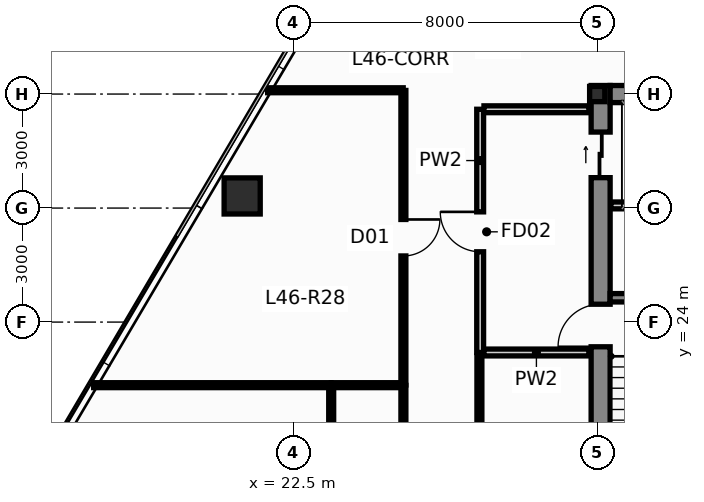
"""IFC4 building model, lengths in metres.
Left out: names, types, materials, properties, quantities, classifications, styles, units other than length and angle.
Written with IfcOpenShell. Run it as: python <this file> out.ifc"""

import sys

from ifc_helpers import new_model, si_unit, direction, frame, frame_2d, origin, origin_2d, place, context, subcontext, project, spatial, rectangle, hollow_rectangle, i_section, extrude, source, transform, mapped, element, fill, save


model = new_model("IFC4")
c1 = context("Model", 3, precision=1e-05, world=origin(), true_north=direction((0.0, 1.0)))
c2 = subcontext(c1, "Body", "Model", "MODEL_VIEW")
j1 = project(units=[si_unit("LENGTHUNIT", "METRE"), si_unit("PLANEANGLEUNIT", "RADIAN")], contexts=[c1])
p1 = place(None, origin())
s1 = spatial("IfcSite", under=j1, at=p1, CompositionType="ELEMENT")
p2 = place(p1, origin())
s2 = spatial("IfcBuilding", under=s1, at=p2, CompositionType="ELEMENT")
p3 = place(p2, frame((0.0, 0.0, 176.75)))
s3 = spatial("IfcBuildingStorey", under=s2, at=p3, CompositionType="ELEMENT", Elevation=176.75)
m1 = source(origin(), c2, "Body", "SweptSolid", [
    extrude(i_section(OverallWidth=0.4, OverallDepth=0.4, WebThickness=0.02, FlangeThickness=0.032, at=origin_2d()), origin(), (0.0, 0.0, 1.0), 3.65),
])
p4 = place(p3, frame((30.5, 30.0, 0.0), z_axis=(0.0, 0.0, 1.0), x_axis=(1.0, 0.0, 0.0)))
e1 = element("IfcColumn", 1, at=p4, inside=s3, PredefinedType="COLUMN", context=c2, shape_type="MappedRepresentation", body=[
    mapped(m1, transform((0.0, 0.0, 0.0), scale=1.0)),
])
p5 = place(p3, frame((30.59, 16.95, 0.0), z_axis=(0.0, 0.0, 1.0), x_axis=(0.0, 1.0, 0.0)))
e2 = element("IfcWall", 2, at=p5, inside=s3, PredefinedType="SHEAR", context=c2, shape_type="SweptSolid", body=[
    extrude(rectangle(XDim=13.275, YDim=0.5, at=frame_2d((6.638, 0.0))), origin(), (0.0, 0.0, 1.0), 3.65),
])
p6 = place(p5, frame((6.4, 0.0, 0.0)))
e3 = element("IfcOpeningElement", 3, at=p6, cuts=e2, PredefinedType="OPENING", context=c2, shape_type="SweptSolid", body=[
    extrude(rectangle(XDim=1.12, YDim=2.15, at=frame_2d((0.56, 1.075))), frame((0.0, 0.262, 0.0), z_axis=(0.0, -1.0, 0.0), x_axis=(1.0, 0.0, 0.0)), (0.0, 0.0, 1.0), 0.524),
])
p7 = place(p5, frame((10.85, 0.0, 0.0)))
e4 = element("IfcOpeningElement", 4, at=p7, cuts=e2, PredefinedType="OPENING", context=c2, shape_type="SweptSolid", body=[
    extrude(rectangle(XDim=1.2, YDim=2.2, at=frame_2d((0.6, 1.1))), frame((0.0, 0.262, 0.0), z_axis=(0.0, -1.0, 0.0), x_axis=(1.0, 0.0, 0.0)), (0.0, 0.0, 1.0), 0.524),
])
p8 = place(p3, frame((30.84, 30.0, 0.0), z_axis=(0.0, 0.0, 1.0), x_axis=(1.0, 0.0, 0.0)))
e5 = element("IfcWall", 5, at=p8, inside=s3, PredefinedType="SHEAR", context=c2, shape_type="SweptSolid", body=[
    extrude(rectangle(XDim=2.9, YDim=0.45, at=frame_2d((1.45, 0.0))), origin(), (0.0, 0.0, 1.0), 3.65),
])
p9 = place(p3, frame((30.84, 24.64, 0.0), z_axis=(0.0, 0.0, 1.0), x_axis=(1.0, 0.0, 0.0)))
e6 = element("IfcWall", 6, at=p9, inside=s3, PredefinedType="SHEAR", context=c2, shape_type="SweptSolid", body=[
    extrude(rectangle(XDim=2.9, YDim=0.22, at=frame_2d((1.45, 0.0))), origin(), (0.0, 0.0, 1.0), 3.65),
])
m2 = source(origin(), c2, "Body", "SweptSolid", [
    extrude(hollow_rectangle(XDim=0.95, YDim=0.95, WallThickness=0.05, at=origin_2d()), origin(), (0.0, 0.0, 1.0), 3.651),
])
p10 = place(p3, frame((21.157, 27.319, 0.0), z_axis=(0.014913299626, -0.013843287097, 0.999792957015), x_axis=(0.680325028146, 0.732910537568, 0.0)))
e7 = element("IfcColumn", 7, at=p10, inside=s3, PredefinedType="COLUMN", context=c2, shape_type="MappedRepresentation", body=[
    mapped(m2, transform((0.0, 0.0, 0.0), scale=1.0)),
])
p11 = place(p3, frame((27.42, 23.2, 0.0), z_axis=(0.0, 0.0, 1.0), x_axis=(0.0, 1.0, 0.0)))
e8 = element("IfcWall", 8, at=p11, inside=s3, PredefinedType="PARTITIONING", context=c2, shape_type="SweptSolid", body=[
    extrude(rectangle(XDim=6.4, YDim=0.18, at=frame_2d((3.2, 0.0))), origin(), (0.0, 0.0, 1.0), 3.078),
])
p12 = place(p11, frame((2.65, 0.0, 0.0)))
e9 = element("IfcOpeningElement", 9, at=p12, cuts=e8, PredefinedType="OPENING", context=c2, shape_type="SweptSolid", body=[
    extrude(rectangle(XDim=1.05, YDim=2.15, at=frame_2d((0.525, 1.075))), frame((0.0, 0.102, 0.0), z_axis=(0.0, -1.0, 0.0), x_axis=(1.0, 0.0, 0.0)), (0.0, 0.0, 1.0), 0.204),
])
p13 = place(p3, frame((27.52, 23.2, 0.0), z_axis=(0.0, 0.0, 1.0), x_axis=(1.0, 0.0, 0.0)))
e10 = element("IfcWall", 10, at=p13, inside=s3, PredefinedType="PARTITIONING", context=c2, shape_type="SweptSolid", body=[
    extrude(rectangle(XDim=2.76, YDim=0.18, at=frame_2d((1.38, 0.0))), origin(), (0.0, 0.0, 1.0), 3.4),
])
p14 = place(p3, frame((27.52, 29.6, 0.0), z_axis=(0.0, 0.0, 1.0), x_axis=(1.0, 0.0, 0.0)))
e11 = element("IfcWall", 11, at=p14, inside=s3, PredefinedType="PARTITIONING", context=c2, shape_type="SweptSolid", body=[
    extrude(rectangle(XDim=2.76, YDim=0.18, at=frame_2d((1.38, 0.0))), origin(), (0.0, 0.0, 1.0), 2.925),
])
p15 = place(p3, frame((30.86, 27.07, 0.0), z_axis=(0.0, 0.0, 1.0), x_axis=(1.0, 0.0, 0.0)))
e12 = element("IfcWall", 12, at=p15, inside=s3, PredefinedType="PARTITIONING", context=c2, shape_type="SweptSolid", body=[
    extrude(rectangle(XDim=2.9, YDim=0.18, at=frame_2d((1.45, 0.0))), origin(), (0.0, 0.0, 1.0), 3.4),
])
p16 = place(p3, frame((25.4, 30.095, 0.0), z_axis=(0.0, 0.0, 1.0), x_axis=(0.0, -1.0, 0.0)))
e13 = element("IfcWall", 13, at=p16, inside=s3, PredefinedType="PARTITIONING", context=c2, shape_type="SweptSolid", body=[
    extrude(rectangle(XDim=7.75, YDim=0.13, at=frame_2d((3.875, 0.0))), origin(), (0.0, 0.0, 1.0), 3.078),
])
p17 = place(p16, frame((3.395, 0.0, 0.0)))
e14 = element("IfcOpeningElement", 14, at=p17, cuts=e13, PredefinedType="OPENING", context=c2, shape_type="SweptSolid", body=[
    extrude(rectangle(XDim=0.96, YDim=2.15, at=frame_2d((0.48, 1.075))), frame((0.0, 0.077, 0.0), z_axis=(0.0, -1.0, 0.0), x_axis=(1.0, 0.0, 0.0)), (0.0, 0.0, 1.0), 0.154),
])
p18 = place(p3, frame((27.4, 16.175, 0.0), z_axis=(0.0, 0.0, 1.0), x_axis=(0.0, 1.0, 0.0)))
e15 = element("IfcWall", 15, at=p18, inside=s3, PredefinedType="PARTITIONING", context=c2, shape_type="SweptSolid", body=[
    extrude(rectangle(XDim=6.93, YDim=0.13, at=frame_2d((3.465, 0.0))), origin(), (0.0, 0.0, 1.0), 3.4),
])
p19 = place(p18, frame((2.985, 0.0, 0.0)))
e16 = element("IfcOpeningElement", 16, at=p19, cuts=e15, PredefinedType="OPENING", context=c2, shape_type="SweptSolid", body=[
    extrude(rectangle(XDim=0.96, YDim=2.15, at=frame_2d((0.48, 1.075))), frame((0.0, 0.077, 0.0), z_axis=(0.0, -1.0, 0.0), x_axis=(1.0, 0.0, 0.0)), (0.0, 0.0, 1.0), 0.154),
])
p20 = place(p3, frame((17.25, 22.34, 0.0), z_axis=(0.0, 0.0, 1.0), x_axis=(1.0, 0.0, 0.0)))
e17 = element("IfcWall", 17, at=p20, inside=s3, PredefinedType="PARTITIONING", context=c2, shape_type="SweptSolid", body=[
    extrude(rectangle(XDim=6.245, YDim=0.13, at=frame_2d((3.123, 0.0))), origin(), (0.0, 0.0, 1.0), 3.4),
])
p21 = place(p3, frame((25.4, 16.175, 0.0), z_axis=(0.0, 0.0, 1.0), x_axis=(0.0, 1.0, 0.0)))
e18 = element("IfcWall", 18, at=p21, inside=s3, PredefinedType="PARTITIONING", context=c2, shape_type="SweptSolid", body=[
    extrude(rectangle(XDim=6.16, YDim=0.13, at=frame_2d((3.08, 0.0))), origin(), (0.0, 0.0, 1.0), 3.078),
])
p22 = place(p21, frame((2.6, 0.0, 0.0)))
e19 = element("IfcOpeningElement", 19, at=p22, cuts=e18, PredefinedType="OPENING", context=c2, shape_type="SweptSolid", body=[
    extrude(rectangle(XDim=0.96, YDim=2.15, at=frame_2d((0.48, 1.075))), frame((0.0, 0.077, 0.0), z_axis=(0.0, -1.0, 0.0), x_axis=(1.0, 0.0, 0.0)), (0.0, 0.0, 1.0), 0.154),
])
p23 = place(p3, frame((23.5, 16.175, 0.0), z_axis=(0.0, 0.0, 1.0), x_axis=(0.0, 1.0, 0.0)))
e20 = element("IfcWall", 20, at=p23, inside=s3, PredefinedType="PARTITIONING", context=c2, shape_type="SweptSolid", body=[
    extrude(rectangle(XDim=6.16, YDim=0.13, at=frame_2d((3.08, 0.0))), origin(), (0.0, 0.0, 1.0), 3.078),
])
p24 = place(p23, frame((2.6, 0.0, 0.0)))
e21 = element("IfcOpeningElement", 21, at=p24, cuts=e20, PredefinedType="OPENING", context=c2, shape_type="SweptSolid", body=[
    extrude(rectangle(XDim=0.96, YDim=2.15, at=frame_2d((0.48, 1.075))), frame((0.0, 0.077, 0.0), z_axis=(0.0, -1.0, 0.0), x_axis=(1.0, 0.0, 0.0)), (0.0, 0.0, 1.0), 0.154),
])
p25 = place(p3, frame((21.827, 30.1, 0.0), z_axis=(0.0, 0.0, 1.0), x_axis=(1.0, 0.0, 0.0)))
e22 = element("IfcWall", 22, at=p25, inside=s3, PredefinedType="PARTITIONING", context=c2, shape_type="SweptSolid", body=[
    extrude(rectangle(XDim=3.568, YDim=0.13, at=frame_2d((1.784, 0.0))), origin(), (0.0, 0.0, 1.0), 3.4),
])
p26 = place(p3, frame((23.505, 22.34, 0.0), z_axis=(0.0, 0.0, 1.0), x_axis=(1.0, 0.0, 0.0)))
e23 = element("IfcWall", 23, at=p26, inside=s3, PredefinedType="PARTITIONING", context=c2, shape_type="SweptSolid", body=[
    extrude(rectangle(XDim=1.89, YDim=0.13, at=frame_2d((0.945, 0.0))), origin(), (0.0, 0.0, 1.0), 3.4),
])
p27 = place(p6, origin())
e24 = element("IfcDoor", 24, at=p27, inside=s3, OperationType="SINGLE_SWING_LEFT", PredefinedType="DOOR", context=c2, shape_type="SweptSolid", body=[
    extrude(rectangle(XDim=1.12, YDim=2.15, at=frame_2d((0.56, 1.075))), frame((0.0, 0.025, 0.0), z_axis=(0.0, -1.0, 0.0), x_axis=(1.0, 0.0, 0.0)), (0.0, 0.0, 1.0), 0.05),
])
fill(e3, e24)
p28 = place(p7, origin())
e25 = element("IfcDoor", 25, at=p28, inside=s3, OperationType="SLIDING_TO_LEFT", PredefinedType="DOOR", context=c2, shape_type="SweptSolid", body=[
    extrude(rectangle(XDim=1.2, YDim=2.2, at=frame_2d((0.6, 1.1))), frame((0.0, 0.025, 0.0), z_axis=(0.0, -1.0, 0.0), x_axis=(1.0, 0.0, 0.0)), (0.0, 0.0, 1.0), 0.05),
])
fill(e4, e25)
p29 = place(p12, origin())
e26 = element("IfcDoor", 26, at=p29, inside=s3, OperationType="SINGLE_SWING_RIGHT", PredefinedType="DOOR", context=c2, shape_type="SweptSolid", body=[
    extrude(rectangle(XDim=1.05, YDim=2.15, at=frame_2d((0.525, 1.075))), frame((0.0, 0.025, 0.0), z_axis=(0.0, -1.0, 0.0), x_axis=(1.0, 0.0, 0.0)), (0.0, 0.0, 1.0), 0.05),
])
fill(e9, e26)
p30 = place(p17, origin())
e27 = element("IfcDoor", 27, at=p30, inside=s3, OperationType="SINGLE_SWING_LEFT", PredefinedType="DOOR", context=c2, shape_type="SweptSolid", body=[
    extrude(rectangle(XDim=0.96, YDim=2.15, at=frame_2d((0.48, 1.075))), frame((0.0, 0.025, 0.0), z_axis=(0.0, -1.0, 0.0), x_axis=(1.0, 0.0, 0.0)), (0.0, 0.0, 1.0), 0.05),
])
fill(e14, e27)
save(model, sys.argv[1])
